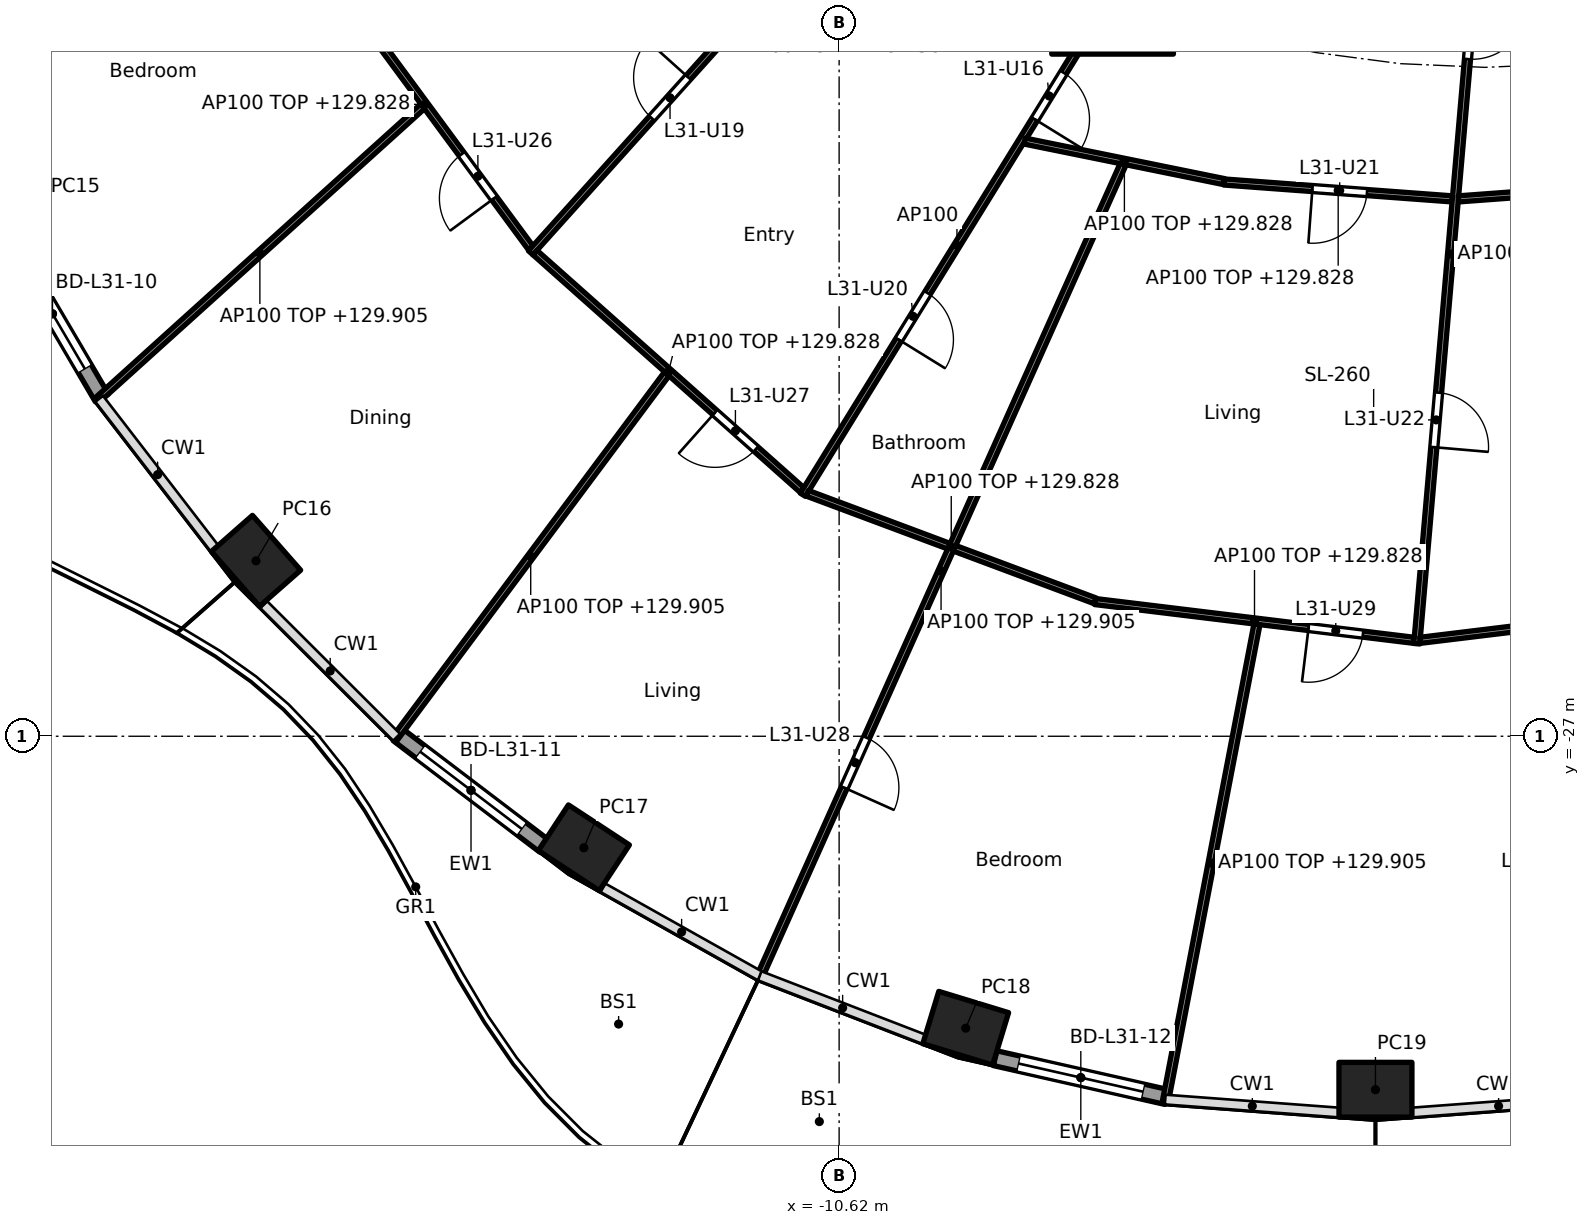
"""IFC4 building model, lengths in metres.
Left out: names, types, materials, properties, quantities, classifications, styles, units other than length and angle.
Written with IfcOpenShell. Run it as: python <this file> out.ifc"""

import sys

from ifc_helpers import new_model, si_unit, direction, frame, frame_2d, origin, origin_2d, place, context, subcontext, project, spatial, rectangle, hollow_rectangle, extrude, element, fill, save


model = new_model("IFC4")
c1 = context("Model", 3, precision=1e-05, world=origin(), true_north=direction((0.0, 1.0)))
c2 = subcontext(c1, "Body", "Model", "MODEL_VIEW")
j1 = project(units=[si_unit("LENGTHUNIT", "METRE"), si_unit("PLANEANGLEUNIT", "RADIAN")], contexts=[c1])
p1 = place(None, origin())
s1 = spatial("IfcSite", under=j1, at=p1, CompositionType="ELEMENT")
p2 = place(p1, origin())
s2 = spatial("IfcBuilding", under=s1, at=p2, CompositionType="ELEMENT")
p3 = place(p2, frame((0.0, 0.0, 127.0)))
s3 = spatial("IfcBuildingStorey", under=s2, at=p3, CompositionType="ELEMENT", Elevation=127.0)
for number, where, z_axis, x_axis in (
    (1, (-20.209, -24.115, 0.0), (0.0, 0.0, 1.0), (0.66, -0.751, 0.0)),
    (2, (-14.817, -28.834, 0.0), (0.0, 0.0, 1.0), (0.836, -0.549, 0.0)),
    (3, (-8.538, -31.801, 0.0), (0.0, 0.0, 1.0), (0.957, -0.292, 0.0)),
    (4, (-1.8, -32.813, 0.0), (0.0, 0.0, 1.0), (1.0, 0.0, 0.0)),
):
    element("IfcColumn", number, at=place(p3, frame(where, z_axis=z_axis, x_axis=x_axis)), inside=s3, PredefinedType="COLUMN", context=c2, shape_type="SweptSolid", body=[
        extrude(hollow_rectangle(XDim=1.2, YDim=0.9, WallThickness=0.04, at=origin_2d()), origin(), (0.0, 0.0, 1.0), 3.7),
    ])
p4 = place(p3, frame((-6.123, -14.782, 0.0), z_axis=(0.0, 0.0, 1.0), x_axis=(1.0, 0.0, 0.0)))
e5 = element("IfcColumn", 5, at=p4, inside=s3, PredefinedType="COLUMN", context=c2, shape_type="SweptSolid", body=[
    extrude(rectangle(XDim=2.0, YDim=2.0, at=origin_2d()), origin(), (0.0, 0.0, 1.0), 3.7),
])
p5 = place(p3, frame((-22.744, -21.436, 0.0), z_axis=(0.0, 0.0, 1.0), x_axis=(-0.506314982873, 0.862348617508, 0.0)))
e6 = element("IfcWall", 6, at=p5, inside=s3, PredefinedType="SOLIDWALL", context=c2, shape_type="SweptSolid", body=[
    extrude(rectangle(XDim=3.208, YDim=0.25, at=frame_2d((1.604, 0.0))), origin(), (0.0, 0.0, 1.0), 3.44),
])
p6 = place(p5, frame((0.554, 0.0, 0.0)))
e7 = element("IfcOpeningElement", 7, at=p6, cuts=e6, PredefinedType="OPENING", context=c2, shape_type="SweptSolid", body=[
    extrude(rectangle(XDim=2.1, YDim=2.4, at=frame_2d((1.05, 1.2))), frame((0.0, 0.135, 0.0), z_axis=(0.0, -1.0, 0.0), x_axis=(1.0, 0.0, 0.0)), (0.0, 0.0, 1.0), 0.27),
])
p7 = place(p3, frame((-15.469, -28.805, 0.0), z_axis=(0.0, 0.0, 1.0), x_axis=(-0.796022231079, 0.605267385233, 0.0)))
e8 = element("IfcWall", 8, at=p7, inside=s3, PredefinedType="SOLIDWALL", context=c2, shape_type="SweptSolid", body=[
    extrude(rectangle(XDim=3.026, YDim=0.25, at=frame_2d((1.513, 0.0))), origin(), (0.0, 0.0, 1.0), 3.44),
])
p8 = place(p7, frame((0.463, 0.0, 0.0)))
e9 = element("IfcOpeningElement", 9, at=p8, cuts=e8, PredefinedType="OPENING", context=c2, shape_type="SweptSolid", body=[
    extrude(rectangle(XDim=2.1, YDim=2.4, at=frame_2d((1.05, 1.2))), frame((0.0, 0.135, 0.0), z_axis=(0.0, -1.0, 0.0), x_axis=(1.0, 0.0, 0.0)), (0.0, 0.0, 1.0), 0.27),
])
p9 = place(p3, frame((-5.236, -32.932, 0.0), z_axis=(0.0, 0.0, 1.0), x_axis=(-0.975339035722, 0.220711951186, 0.0)))
e10 = element("IfcWall", 10, at=p9, inside=s3, PredefinedType="SOLIDWALL", context=c2, shape_type="SweptSolid", body=[
    extrude(rectangle(XDim=2.89, YDim=0.25, at=frame_2d((1.445, 0.0))), origin(), (0.0, 0.0, 1.0), 3.44),
])
p10 = place(p9, frame((0.395, 0.0, 0.0)))
e11 = element("IfcOpeningElement", 11, at=p10, cuts=e10, PredefinedType="OPENING", context=c2, shape_type="SweptSolid", body=[
    extrude(rectangle(XDim=2.1, YDim=2.4, at=frame_2d((1.05, 1.2))), frame((0.0, 0.135, 0.0), z_axis=(0.0, -1.0, 0.0), x_axis=(1.0, 0.0, 0.0)), (0.0, 0.0, 1.0), 0.27),
])
p11 = place(p3, frame((-19.176, -14.244, 0.0), z_axis=(0.0, 0.0, 1.0), x_axis=(0.593532053206, -0.80481035146, 0.0)))
e12 = element("IfcWall", 12, at=p11, inside=s3, PredefinedType="PARTITIONING", context=c2, shape_type="SweptSolid", body=[
    extrude(rectangle(XDim=5.876, YDim=0.1, at=frame_2d((2.938, 0.0))), origin(), (0.0, 0.0, 1.0), 2.828),
])
p12 = place(p11, frame((3.957, 0.0, 0.0)))
e13 = element("IfcOpeningElement", 13, at=p12, cuts=e12, PredefinedType="OPENING", context=c2, shape_type="SweptSolid", body=[
    extrude(rectangle(XDim=0.9, YDim=2.1, at=frame_2d((0.45, 1.05))), frame((0.0, 0.06, 0.0), z_axis=(0.0, -1.0, 0.0), x_axis=(1.0, 0.0, 0.0)), (0.0, 0.0, 1.0), 0.12),
])
p13 = place(p3, frame((-17.47, -16.642, 0.0), z_axis=(0.0, 0.0, 1.0), x_axis=(-0.742345465337, -0.670017320742, 0.0)))
e14 = element("IfcWall", 14, at=p13, inside=s3, PredefinedType="PARTITIONING", context=c2, shape_type="SweptSolid", body=[
    extrude(rectangle(XDim=7.21, YDim=0.1, at=frame_2d((3.605, 0.0))), origin(), (0.0, 0.0, 1.0), 2.905),
])
p14 = place(p3, frame((-7.725, -10.186, 0.0), z_axis=(0.0, 0.0, 1.0), x_axis=(-0.668498346565, -0.743713628112, 0.0)))
e15 = element("IfcWall", 15, at=p14, inside=s3, PredefinedType="PARTITIONING", context=c2, shape_type="SweptSolid", body=[
    extrude(rectangle(XDim=11.919, YDim=0.1, at=frame_2d((5.959, 0.0))), origin(), (0.0, 0.0, 1.0), 2.756),
])
p15 = place(p14, frame((2.106, 0.0, 0.0)))
e16 = element("IfcOpeningElement", 16, at=p15, cuts=e15, PredefinedType="OPENING", context=c2, shape_type="SweptSolid", body=[
    extrude(rectangle(XDim=0.9, YDim=2.1, at=frame_2d((0.45, 1.05))), frame((0.0, 0.06, 0.0), z_axis=(0.0, -1.0, 0.0), x_axis=(1.0, 0.0, 0.0)), (0.0, 0.0, 1.0), 0.12),
])
p16 = place(p14, frame((8.041, 0.0, 0.0)))
e17 = element("IfcOpeningElement", 17, at=p16, cuts=e15, PredefinedType="OPENING", context=c2, shape_type="SweptSolid", body=[
    extrude(rectangle(XDim=0.9, YDim=2.1, at=frame_2d((0.45, 1.05))), frame((0.0, 0.06, 0.0), z_axis=(0.0, -1.0, 0.0), x_axis=(1.0, 0.0, 0.0)), (0.0, 0.0, 1.0), 0.12),
])
p17 = place(p3, frame((-15.622, -19.046, 0.0), z_axis=(0.0, 0.0, 1.0), x_axis=(0.747342891849, -0.664438561496, 0.0)))
e18 = element("IfcWall", 18, at=p17, inside=s3, PredefinedType="PARTITIONING", context=c2, shape_type="SweptSolid", body=[
    extrude(rectangle(XDim=5.881, YDim=0.1, at=frame_2d((2.94, 0.0))), origin(), (0.0, 0.0, 1.0), 2.828),
])
p18 = place(p17, frame((3.961, 0.0, 0.0)))
e19 = element("IfcOpeningElement", 19, at=p18, cuts=e18, PredefinedType="OPENING", context=c2, shape_type="SweptSolid", body=[
    extrude(rectangle(XDim=0.9, YDim=2.1, at=frame_2d((0.45, 1.05))), frame((0.0, 0.06, 0.0), z_axis=(0.0, -1.0, 0.0), x_axis=(1.0, 0.0, 0.0)), (0.0, 0.0, 1.0), 0.12),
])
p19 = place(p3, frame((-13.454, -21.04, 0.0), z_axis=(0.0, 0.0, 1.0), x_axis=(-0.597848033124, -0.801609461826, 0.0)))
e20 = element("IfcWall", 20, at=p19, inside=s3, PredefinedType="PARTITIONING", context=c2, shape_type="SweptSolid", body=[
    extrude(rectangle(XDim=7.486, YDim=0.1, at=frame_2d((3.743, 0.0))), origin(), (0.0, 0.0, 1.0), 2.905),
])
p20 = place(p3, frame((-6.149, -14.825, 0.0), z_axis=(0.0, 0.0, 1.0), x_axis=(-0.525396393596, -0.850857584791, 0.0)))
e21 = element("IfcWall", 21, at=p20, inside=s3, PredefinedType="PARTITIONING", context=c2, shape_type="SweptSolid", body=[
    extrude(rectangle(XDim=9.643, YDim=0.1, at=frame_2d((4.822, 0.0))), origin(), (0.0, 0.0, 1.0), 3.44),
])
p21 = place(p20, frame((1.485, 0.0, 0.0)))
e22 = element("IfcOpeningElement", 22, at=p21, cuts=e21, PredefinedType="OPENING", context=c2, shape_type="SweptSolid", body=[
    extrude(rectangle(XDim=0.9, YDim=2.1, at=frame_2d((0.45, 1.05))), frame((0.0, 0.06, 0.0), z_axis=(0.0, -1.0, 0.0), x_axis=(1.0, 0.0, 0.0)), (0.0, 0.0, 1.0), 0.12),
])
p22 = place(p20, frame((5.744, 0.0, 0.0)))
e23 = element("IfcOpeningElement", 23, at=p22, cuts=e21, PredefinedType="OPENING", context=c2, shape_type="SweptSolid", body=[
    extrude(rectangle(XDim=0.9, YDim=2.1, at=frame_2d((0.45, 1.05))), frame((0.0, 0.06, 0.0), z_axis=(0.0, -1.0, 0.0), x_axis=(1.0, 0.0, 0.0)), (0.0, 0.0, 1.0), 0.12),
])
p23 = place(p3, frame((-7.568, -17.212, 0.0), z_axis=(0.0, 0.0, 1.0), x_axis=(0.979967079473, -0.199159541946, 0.0)))
e24 = element("IfcWall", 24, at=p23, inside=s3, PredefinedType="PARTITIONING", context=c2, shape_type="SweptSolid", body=[
    extrude(rectangle(XDim=3.347, YDim=0.1, at=frame_2d((1.673, 0.0))), origin(), (0.0, 0.0, 1.0), 2.828),
])
p24 = place(p3, frame((-11.143, -23.004, 0.0), z_axis=(0.0, 0.0, 1.0), x_axis=(0.936721765635, -0.350074754567, 0.0)))
e25 = element("IfcWall", 25, at=p24, inside=s3, PredefinedType="PARTITIONING", context=c2, shape_type="SweptSolid", body=[
    extrude(rectangle(XDim=5.053, YDim=0.1, at=frame_2d((2.526, 0.0))), origin(), (0.0, 0.0, 1.0), 2.828),
])
p25 = place(p3, frame((-5.949, -17.591, 0.0), z_axis=(0.0, 0.0, 1.0), x_axis=(-0.40838467696, -0.912809923053, 0.0)))
e26 = element("IfcWall", 26, at=p25, inside=s3, PredefinedType="PARTITIONING", context=c2, shape_type="SweptSolid", body=[
    extrude(rectangle(XDim=14.665, YDim=0.1, at=frame_2d((7.333, 0.0))), origin(), (0.0, 0.0, 1.0), 2.905),
])
p26 = place(p25, frame((10.334, 0.0, 0.0)))
e27 = element("IfcOpeningElement", 27, at=p26, cuts=e26, PredefinedType="OPENING", context=c2, shape_type="SweptSolid", body=[
    extrude(rectangle(XDim=0.9, YDim=2.1, at=frame_2d((0.45, 1.05))), frame((0.0, 0.06, 0.0), z_axis=(0.0, -1.0, 0.0), x_axis=(1.0, 0.0, 0.0)), (0.0, 0.0, 1.0), 0.12),
])
p27 = place(p3, frame((-4.29, -17.885, 0.0), z_axis=(0.0, 0.0, 1.0), x_axis=(0.997272353708, -0.073809569363, 0.0)))
e28 = element("IfcWall", 28, at=p27, inside=s3, PredefinedType="PARTITIONING", context=c2, shape_type="SweptSolid", body=[
    extrude(rectangle(XDim=3.764, YDim=0.1, at=frame_2d((1.882, 0.0))), origin(), (0.0, 0.0, 1.0), 2.828),
])
p28 = place(p27, frame((1.457, 0.0, 0.0)))
e29 = element("IfcOpeningElement", 29, at=p28, cuts=e28, PredefinedType="OPENING", context=c2, shape_type="SweptSolid", body=[
    extrude(rectangle(XDim=0.9, YDim=2.1, at=frame_2d((0.45, 1.05))), frame((0.0, 0.06, 0.0), z_axis=(0.0, -1.0, 0.0), x_axis=(1.0, 0.0, 0.0)), (0.0, 0.0, 1.0), 0.12),
])
p29 = place(p3, frame((-6.413, -24.784, 0.0), z_axis=(0.0, 0.0, 1.0), x_axis=(0.992690077723, -0.120691381588, 0.0)))
e30 = element("IfcWall", 30, at=p29, inside=s3, PredefinedType="PARTITIONING", context=c2, shape_type="SweptSolid", body=[
    extrude(rectangle(XDim=5.286, YDim=0.1, at=frame_2d((2.643, 0.0))), origin(), (0.0, 0.0, 1.0), 2.828),
])
p30 = place(p29, frame((3.539, 0.0, 0.0)))
e31 = element("IfcOpeningElement", 31, at=p30, cuts=e30, PredefinedType="OPENING", context=c2, shape_type="SweptSolid", body=[
    extrude(rectangle(XDim=0.9, YDim=2.1, at=frame_2d((0.45, 1.05))), frame((0.0, 0.06, 0.0), z_axis=(0.0, -1.0, 0.0), x_axis=(1.0, 0.0, 0.0)), (0.0, 0.0, 1.0), 0.12),
])
p31 = place(p3, frame((-3.749, -25.159, 0.0), z_axis=(0.0, 0.0, 1.0), x_axis=(-0.188392334675, -0.982093848996, 0.0)))
e32 = element("IfcWall", 32, at=p31, inside=s3, PredefinedType="PARTITIONING", context=c2, shape_type="SweptSolid", body=[
    extrude(rectangle(XDim=8.0, YDim=0.1, at=frame_2d((4.0, 0.0))), origin(), (0.0, 0.0, 1.0), 2.905),
])
p32 = place(p3, frame((-0.009, -12.664, 0.0), z_axis=(0.0, 0.0, 1.0), x_axis=(-0.086441225464, -0.996256952066, 0.0)))
e33 = element("IfcWall", 33, at=p32, inside=s3, PredefinedType="PARTITIONING", context=c2, shape_type="SweptSolid", body=[
    extrude(rectangle(XDim=12.862, YDim=0.1, at=frame_2d((6.431, 0.0))), origin(), (0.0, 0.0, 1.0), 2.756),
])
p33 = place(p32, frame((2.312, 0.0, 0.0)))
e34 = element("IfcOpeningElement", 34, at=p33, cuts=e33, PredefinedType="OPENING", context=c2, shape_type="SweptSolid", body=[
    extrude(rectangle(XDim=0.9, YDim=2.1, at=frame_2d((0.45, 1.05))), frame((0.0, 0.06, 0.0), z_axis=(0.0, -1.0, 0.0), x_axis=(1.0, 0.0, 0.0)), (0.0, 0.0, 1.0), 0.12),
])
p34 = place(p32, frame((8.718, 0.0, 0.0)))
e35 = element("IfcOpeningElement", 35, at=p34, cuts=e33, PredefinedType="OPENING", context=c2, shape_type="SweptSolid", body=[
    extrude(rectangle(XDim=0.9, YDim=2.1, at=frame_2d((0.45, 1.05))), frame((0.0, 0.06, 0.0), z_axis=(0.0, -1.0, 0.0), x_axis=(1.0, 0.0, 0.0)), (0.0, 0.0, 1.0), 0.12),
])
p35 = place(p3, frame((-0.436, -18.163, 0.0), z_axis=(0.0, 0.0, 1.0), x_axis=(0.997271025958, 0.073827506966, 0.0)))
e36 = element("IfcWall", 36, at=p35, inside=s3, PredefinedType="PARTITIONING", context=c2, shape_type="SweptSolid", body=[
    extrude(rectangle(XDim=3.664, YDim=0.1, at=frame_2d((1.832, 0.0))), origin(), (0.0, 0.0, 1.0), 2.828),
])
p36 = place(p3, frame((-1.066, -25.422, 0.0), z_axis=(0.0, 0.0, 1.0), x_axis=(0.992692993044, 0.120667400577, 0.0)))
e37 = element("IfcWall", 37, at=p36, inside=s3, PredefinedType="PARTITIONING", context=c2, shape_type="SweptSolid", body=[
    extrude(rectangle(XDim=5.186, YDim=0.1, at=frame_2d((2.593, 0.0))), origin(), (0.0, 0.0, 1.0), 2.828),
])
p37 = place(p6, origin())
e38 = element("IfcDoor", 38, at=p37, inside=s3, OperationType="SLIDING_TO_LEFT", PredefinedType="DOOR", context=c2, shape_type="SweptSolid", body=[
    extrude(rectangle(XDim=2.1, YDim=2.4, at=frame_2d((1.05, 1.2))), frame((0.0, 0.025, 0.0), z_axis=(0.0, -1.0, 0.0), x_axis=(1.0, 0.0, 0.0)), (0.0, 0.0, 1.0), 0.05),
])
fill(e7, e38)
p38 = place(p8, origin())
e39 = element("IfcDoor", 39, at=p38, inside=s3, OperationType="SLIDING_TO_LEFT", PredefinedType="DOOR", context=c2, shape_type="SweptSolid", body=[
    extrude(rectangle(XDim=2.1, YDim=2.4, at=frame_2d((1.05, 1.2))), frame((0.0, 0.025, 0.0), z_axis=(0.0, -1.0, 0.0), x_axis=(1.0, 0.0, 0.0)), (0.0, 0.0, 1.0), 0.05),
])
fill(e9, e39)
p39 = place(p10, origin())
e40 = element("IfcDoor", 40, at=p39, inside=s3, OperationType="SLIDING_TO_LEFT", PredefinedType="DOOR", context=c2, shape_type="SweptSolid", body=[
    extrude(rectangle(XDim=2.1, YDim=2.4, at=frame_2d((1.05, 1.2))), frame((0.0, 0.025, 0.0), z_axis=(0.0, -1.0, 0.0), x_axis=(1.0, 0.0, 0.0)), (0.0, 0.0, 1.0), 0.05),
])
fill(e11, e40)
p40 = place(p21, origin())
e41 = element("IfcDoor", 41, at=p40, inside=s3, OperationType="SINGLE_SWING_RIGHT", PredefinedType="DOOR", context=c2, shape_type="SweptSolid", body=[
    extrude(rectangle(XDim=0.9, YDim=2.1, at=frame_2d((0.45, 1.05))), frame((0.0, 0.025, 0.0), z_axis=(0.0, -1.0, 0.0), x_axis=(1.0, 0.0, 0.0)), (0.0, 0.0, 1.0), 0.05),
])
fill(e22, e41)
p41 = place(p33, origin())
e42 = element("IfcDoor", 42, at=p41, inside=s3, OperationType="SINGLE_SWING_LEFT", PredefinedType="DOOR", context=c2, shape_type="SweptSolid", body=[
    extrude(rectangle(XDim=0.9, YDim=2.1, at=frame_2d((0.45, 1.05))), frame((0.0, 0.025, 0.0), z_axis=(0.0, -1.0, 0.0), x_axis=(1.0, 0.0, 0.0)), (0.0, 0.0, 1.0), 0.05),
])
fill(e34, e42)
p42 = place(p16, frame((0.9, 0.0, 0.0), x_axis=(-1.0, 0.0, 0.0)))
e43 = element("IfcDoor", 43, at=p42, inside=s3, OperationType="SINGLE_SWING_RIGHT", PredefinedType="DOOR", context=c2, shape_type="SweptSolid", body=[
    extrude(rectangle(XDim=0.9, YDim=2.1, at=frame_2d((0.45, 1.05))), frame((0.0, 0.025, 0.0), z_axis=(0.0, -1.0, 0.0), x_axis=(1.0, 0.0, 0.0)), (0.0, 0.0, 1.0), 0.05),
])
fill(e17, e43)
p43 = place(p22, origin())
e44 = element("IfcDoor", 44, at=p43, inside=s3, OperationType="SINGLE_SWING_RIGHT", PredefinedType="DOOR", context=c2, shape_type="SweptSolid", body=[
    extrude(rectangle(XDim=0.9, YDim=2.1, at=frame_2d((0.45, 1.05))), frame((0.0, 0.025, 0.0), z_axis=(0.0, -1.0, 0.0), x_axis=(1.0, 0.0, 0.0)), (0.0, 0.0, 1.0), 0.05),
])
fill(e23, e44)
p44 = place(p28, frame((0.9, 0.0, 0.0), x_axis=(-1.0, 0.0, 0.0)))
e45 = element("IfcDoor", 45, at=p44, inside=s3, OperationType="SINGLE_SWING_RIGHT", PredefinedType="DOOR", context=c2, shape_type="SweptSolid", body=[
    extrude(rectangle(XDim=0.9, YDim=2.1, at=frame_2d((0.45, 1.05))), frame((0.0, 0.025, 0.0), z_axis=(0.0, -1.0, 0.0), x_axis=(1.0, 0.0, 0.0)), (0.0, 0.0, 1.0), 0.05),
])
fill(e29, e45)
p45 = place(p34, origin())
e46 = element("IfcDoor", 46, at=p45, inside=s3, OperationType="SINGLE_SWING_RIGHT", PredefinedType="DOOR", context=c2, shape_type="SweptSolid", body=[
    extrude(rectangle(XDim=0.9, YDim=2.1, at=frame_2d((0.45, 1.05))), frame((0.0, 0.025, 0.0), z_axis=(0.0, -1.0, 0.0), x_axis=(1.0, 0.0, 0.0)), (0.0, 0.0, 1.0), 0.05),
])
fill(e35, e46)
p46 = place(p12, frame((0.9, 0.0, 0.0), x_axis=(-1.0, 0.0, 0.0)))
e47 = element("IfcDoor", 47, at=p46, inside=s3, OperationType="SINGLE_SWING_LEFT", PredefinedType="DOOR", context=c2, shape_type="SweptSolid", body=[
    extrude(rectangle(XDim=0.9, YDim=2.1, at=frame_2d((0.45, 1.05))), frame((0.0, 0.025, 0.0), z_axis=(0.0, -1.0, 0.0), x_axis=(1.0, 0.0, 0.0)), (0.0, 0.0, 1.0), 0.05),
])
fill(e13, e47)
p47 = place(p18, frame((0.9, 0.0, 0.0), x_axis=(-1.0, 0.0, 0.0)))
e48 = element("IfcDoor", 48, at=p47, inside=s3, OperationType="SINGLE_SWING_RIGHT", PredefinedType="DOOR", context=c2, shape_type="SweptSolid", body=[
    extrude(rectangle(XDim=0.9, YDim=2.1, at=frame_2d((0.45, 1.05))), frame((0.0, 0.025, 0.0), z_axis=(0.0, -1.0, 0.0), x_axis=(1.0, 0.0, 0.0)), (0.0, 0.0, 1.0), 0.05),
])
fill(e19, e48)
p48 = place(p26, origin())
e49 = element("IfcDoor", 49, at=p48, inside=s3, OperationType="SINGLE_SWING_RIGHT", PredefinedType="DOOR", context=c2, shape_type="SweptSolid", body=[
    extrude(rectangle(XDim=0.9, YDim=2.1, at=frame_2d((0.45, 1.05))), frame((0.0, 0.025, 0.0), z_axis=(0.0, -1.0, 0.0), x_axis=(1.0, 0.0, 0.0)), (0.0, 0.0, 1.0), 0.05),
])
fill(e27, e49)
p49 = place(p30, frame((0.9, 0.0, 0.0), x_axis=(-1.0, 0.0, 0.0)))
e50 = element("IfcDoor", 50, at=p49, inside=s3, OperationType="SINGLE_SWING_RIGHT", PredefinedType="DOOR", context=c2, shape_type="SweptSolid", body=[
    extrude(rectangle(XDim=0.9, YDim=2.1, at=frame_2d((0.45, 1.05))), frame((0.0, 0.025, 0.0), z_axis=(0.0, -1.0, 0.0), x_axis=(1.0, 0.0, 0.0)), (0.0, 0.0, 1.0), 0.05),
])
fill(e31, e50)
save(model, sys.argv[1])
